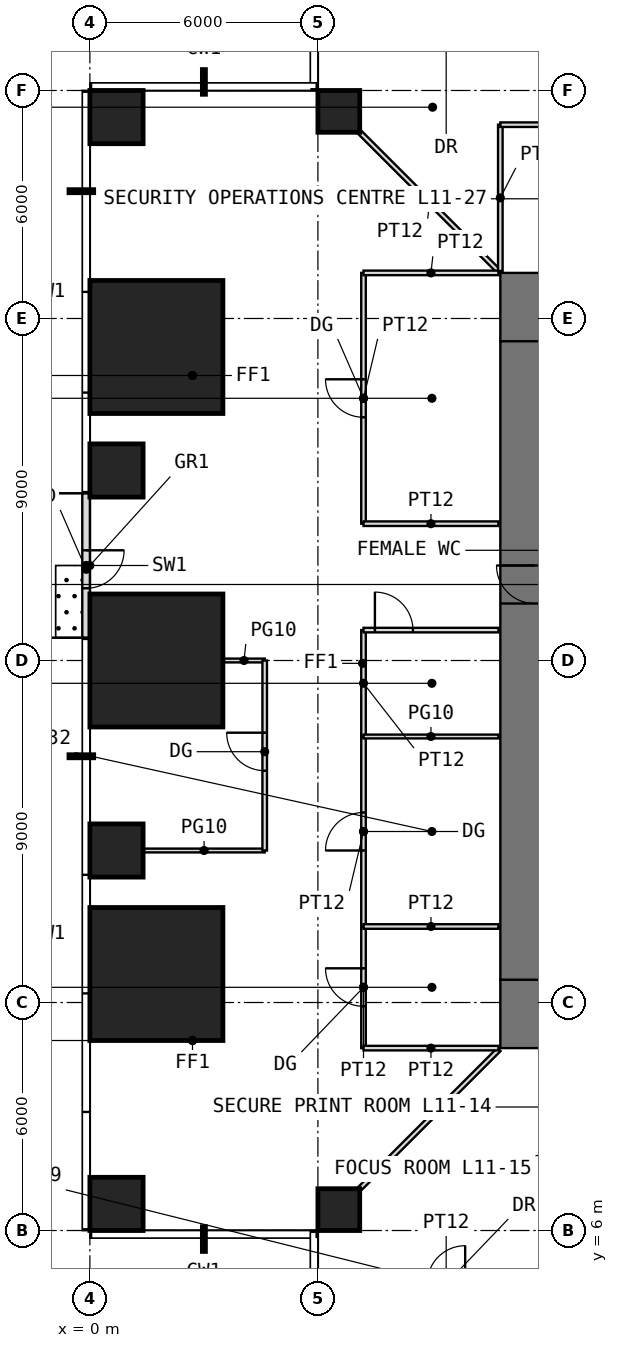
"""IFC4 building model, lengths in metres.
Left out: names, types, materials, properties, quantities, classifications, styles, units other than length and angle.
Written with IfcOpenShell. Run it as: python <this file> out.ifc"""

import sys

from ifc_helpers import new_model, si_unit, direction, frame, frame_2d, origin, origin_2d, place, context, subcontext, project, spatial, rectangle, extrude, element, fill, save


model = new_model("IFC4")
c1 = context("Model", 3, precision=1e-05, world=origin(), true_north=direction((0.0, 1.0)))
c2 = subcontext(c1, "Body", "Model", "MODEL_VIEW")
j1 = project(units=[si_unit("LENGTHUNIT", "METRE"), si_unit("PLANEANGLEUNIT", "RADIAN")], contexts=[c1])
p1 = place(None, origin())
s1 = spatial("IfcSite", under=j1, at=p1, CompositionType="ELEMENT")
p2 = place(p1, origin())
s2 = spatial("IfcBuilding", under=s1, at=p2, CompositionType="ELEMENT")
p3 = place(p2, frame((0.0, 0.0, 50.5)))
s3 = spatial("IfcBuildingStorey", under=s2, at=p3, CompositionType="ELEMENT", Elevation=50.5)
p4 = place(p3, frame((0.7, 6.7, 0.0), z_axis=(0.0, 0.0, 1.0), x_axis=(1.0, 0.0, 0.0)))
e1 = element("IfcColumn", 1, at=p4, inside=s3, PredefinedType="COLUMN", context=c2, shape_type="SweptSolid", body=[
    extrude(rectangle(XDim=1.4, YDim=1.4, at=origin_2d()), origin(), (0.0, 0.0, 1.0), 4.0),
])
p5 = place(p3, frame((6.55, 6.55, 0.0), z_axis=(0.0, 0.0, 1.0), x_axis=(1.0, 0.0, 0.0)))
e2 = element("IfcColumn", 2, at=p5, inside=s3, PredefinedType="COLUMN", context=c2, shape_type="SweptSolid", body=[
    extrude(rectangle(XDim=1.1, YDim=1.1, at=origin_2d()), origin(), (0.0, 0.0, 1.0), 4.0),
])
p6 = place(p3, frame((1.75, 12.75, 0.0), z_axis=(0.0, 0.0, 1.0), x_axis=(1.0, 0.0, 0.0)))
e3 = element("IfcColumn", 3, at=p6, inside=s3, PredefinedType="COLUMN", context=c2, shape_type="SweptSolid", body=[
    extrude(rectangle(XDim=3.5, YDim=3.5, at=origin_2d()), origin(), (0.0, 0.0, 1.0), 4.0),
])
p7 = place(p3, frame((0.7, 16.0, 0.0), z_axis=(0.0, 0.0, 1.0), x_axis=(1.0, 0.0, 0.0)))
e4 = element("IfcColumn", 4, at=p7, inside=s3, PredefinedType="COLUMN", context=c2, shape_type="SweptSolid", body=[
    extrude(rectangle(XDim=1.4, YDim=1.4, at=origin_2d()), origin(), (0.0, 0.0, 1.0), 4.0),
])
p8 = place(p3, frame((1.75, 21.0, 0.0), z_axis=(0.0, 0.0, 1.0), x_axis=(1.0, 0.0, 0.0)))
e5 = element("IfcColumn", 5, at=p8, inside=s3, PredefinedType="COLUMN", context=c2, shape_type="SweptSolid", body=[
    extrude(rectangle(XDim=3.5, YDim=3.5, at=origin_2d()), origin(), (0.0, 0.0, 1.0), 4.0),
])
p9 = place(p3, frame((0.7, 26.0, 0.0), z_axis=(0.0, 0.0, 1.0), x_axis=(1.0, 0.0, 0.0)))
e6 = element("IfcColumn", 6, at=p9, inside=s3, PredefinedType="COLUMN", context=c2, shape_type="SweptSolid", body=[
    extrude(rectangle(XDim=1.4, YDim=1.4, at=origin_2d()), origin(), (0.0, 0.0, 1.0), 4.0),
])
p10 = place(p3, frame((1.75, 29.25, 0.0), z_axis=(0.0, 0.0, 1.0), x_axis=(1.0, 0.0, 0.0)))
e7 = element("IfcColumn", 7, at=p10, inside=s3, PredefinedType="COLUMN", context=c2, shape_type="SweptSolid", body=[
    extrude(rectangle(XDim=3.5, YDim=3.5, at=origin_2d()), origin(), (0.0, 0.0, 1.0), 4.0),
])
p11 = place(p3, frame((0.7, 35.3, 0.0), z_axis=(0.0, 0.0, 1.0), x_axis=(1.0, 0.0, 0.0)))
e8 = element("IfcColumn", 8, at=p11, inside=s3, PredefinedType="COLUMN", context=c2, shape_type="SweptSolid", body=[
    extrude(rectangle(XDim=1.4, YDim=1.4, at=origin_2d()), origin(), (0.0, 0.0, 1.0), 4.0),
])
p12 = place(p3, frame((6.55, 35.45, 0.0), z_axis=(0.0, 0.0, 1.0), x_axis=(1.0, 0.0, 0.0)))
e9 = element("IfcColumn", 9, at=p12, inside=s3, PredefinedType="COLUMN", context=c2, shape_type="SweptSolid", body=[
    extrude(rectangle(XDim=1.1, YDim=1.1, at=origin_2d()), origin(), (0.0, 0.0, 1.0), 4.0),
])
p13 = place(p3, frame((-0.1, 25.4, 0.0), z_axis=(0.0, 0.0, 1.0), x_axis=(0.0, -1.0, 0.0)))
e10 = element("IfcWall", 10, at=p13, inside=s3, PredefinedType="USERDEFINED", context=c2, shape_type="SweptSolid", body=[
    extrude(rectangle(XDim=3.8, YDim=0.2, at=frame_2d((1.9, 0.0))), origin(), (0.0, 0.0, 1.0), 3.75),
])
p14 = place(p13, frame((1.5, 0.0, 0.0)))
e11 = element("IfcOpeningElement", 11, at=p14, cuts=e10, PredefinedType="OPENING", context=c2, shape_type="SweptSolid", body=[
    extrude(rectangle(XDim=1.0, YDim=2.4, at=frame_2d((0.5, 1.2))), frame((0.0, 0.11, 0.0), z_axis=(0.0, -1.0, 0.0), x_axis=(1.0, 0.0, 0.0)), (0.0, 0.0, 1.0), 0.22),
])
p15 = place(p3, frame((10.8, 11.7, -0.05), z_axis=(0.0, 0.0, 1.0), x_axis=(1.0, 0.0, 0.0)))
e12 = element("IfcWall", 12, at=p15, inside=s3, PredefinedType="SHEAR", context=c2, shape_type="SweptSolid", body=[
    extrude(rectangle(XDim=20.4, YDim=1.8, at=frame_2d((10.2, 0.0))), origin(), (0.0, 0.0, 1.0), 4.0),
])
p16 = place(p15, frame((9.2, 0.0, 0.05)))
e13 = element("IfcOpeningElement", 13, at=p16, cuts=e12, PredefinedType="OPENING", context=c2, shape_type="SweptSolid", body=[
    extrude(rectangle(XDim=2.0, YDim=2.2, at=frame_2d((1.0, 1.1))), frame((0.0, 0.91, 0.0), z_axis=(0.0, -1.0, 0.0), x_axis=(1.0, 0.0, 0.0)), (0.0, 0.0, 1.0), 1.82),
])
p17 = place(p3, frame((10.8, 30.3, -0.05), z_axis=(0.0, 0.0, 1.0), x_axis=(1.0, 0.0, 0.0)))
e14 = element("IfcWall", 14, at=p17, inside=s3, PredefinedType="SHEAR", context=c2, shape_type="SweptSolid", body=[
    extrude(rectangle(XDim=20.4, YDim=1.8, at=frame_2d((10.2, 0.0))), origin(), (0.0, 0.0, 1.0), 4.0),
])
p18 = place(p17, frame((9.2, 0.0, 0.05)))
e15 = element("IfcOpeningElement", 15, at=p18, cuts=e14, PredefinedType="OPENING", context=c2, shape_type="SweptSolid", body=[
    extrude(rectangle(XDim=2.0, YDim=2.2, at=frame_2d((1.0, 1.1))), frame((0.0, 0.91, 0.0), z_axis=(0.0, -1.0, 0.0), x_axis=(1.0, 0.0, 0.0)), (0.0, 0.0, 1.0), 1.82),
])
p19 = place(p3, frame((11.7, 12.6, -0.05), z_axis=(0.0, 0.0, 1.0), x_axis=(0.0, 1.0, 0.0)))
e16 = element("IfcWall", 16, at=p19, inside=s3, PredefinedType="SHEAR", context=c2, shape_type="SweptSolid", body=[
    extrude(rectangle(XDim=16.8, YDim=1.8, at=frame_2d((8.4, 0.0))), origin(), (0.0, 0.0, 1.0), 4.0),
])
p20 = place(p19, frame((9.9, 0.0, 0.05)))
e17 = element("IfcOpeningElement", 17, at=p20, cuts=e16, PredefinedType="OPENING", context=c2, shape_type="SweptSolid", body=[
    extrude(rectangle(XDim=1.0, YDim=2.2, at=frame_2d((0.5, 1.1))), frame((0.0, 0.91, 0.0), z_axis=(0.0, -1.0, 0.0), x_axis=(1.0, 0.0, 0.0)), (0.0, 0.0, 1.0), 1.82),
])
p21 = place(p3, frame((1.41, 16.0, 0.0), z_axis=(0.0, 0.0, 1.0), x_axis=(1.0, 0.0, 0.0)))
e18 = element("IfcWall", 18, at=p21, inside=s3, PredefinedType="PARTITIONING", context=c2, shape_type="SweptSolid", body=[
    extrude(rectangle(XDim=3.19, YDim=0.1, at=frame_2d((1.595, 0.0))), origin(), (0.0, 0.0, 1.0), 3.75),
])
p22 = place(p3, frame((3.51, 21.0, 0.0), z_axis=(0.0, 0.0, 1.0), x_axis=(1.0, 0.0, 0.0)))
e19 = element("IfcWall", 19, at=p22, inside=s3, PredefinedType="PARTITIONING", context=c2, shape_type="SweptSolid", body=[
    extrude(rectangle(XDim=1.09, YDim=0.1, at=frame_2d((0.545, 0.0))), origin(), (0.0, 0.0, 1.0), 3.75),
])
p23 = place(p3, frame((4.6, 16.0, 0.0), z_axis=(0.0, 0.0, 1.0), x_axis=(0.0, 1.0, 0.0)))
e20 = element("IfcWall", 20, at=p23, inside=s3, PredefinedType="PARTITIONING", context=c2, shape_type="SweptSolid", body=[
    extrude(rectangle(XDim=5.0, YDim=0.12, at=frame_2d((2.5, 0.0))), origin(), (0.0, 0.0, 1.0), 3.75),
])
p24 = place(p23, frame((2.1, 0.0, 0.0)))
e21 = element("IfcOpeningElement", 21, at=p24, cuts=e20, PredefinedType="OPENING", context=c2, shape_type="SweptSolid", body=[
    extrude(rectangle(XDim=1.0, YDim=2.4, at=frame_2d((0.5, 1.2))), frame((0.0, 0.07, 0.0), z_axis=(0.0, -1.0, 0.0), x_axis=(1.0, 0.0, 0.0)), (0.0, 0.0, 1.0), 0.14),
])
for number, where, z_axis, x_axis in (
    (22, (7.11, 7.11, 0.0), (0.0, 0.0, 1.0), (0.707, 0.707, 0.0)),
    (23, (7.11, 34.89, 0.0), (0.0, 0.0, 1.0), (0.707, -0.707, 0.0)),
):
    element("IfcWall", number, at=place(p3, frame(where, z_axis=z_axis, x_axis=x_axis)), inside=s3, PredefinedType="PARTITIONING", context=c2, shape_type="SweptSolid", body=[
        extrude(rectangle(XDim=5.168, YDim=0.12, at=frame_2d((2.584, 0.0))), origin(), (0.0, 0.0, 1.0), 3.75),
    ])
p25 = place(p3, frame((7.2, 10.8, 0.0), z_axis=(0.0, 0.0, 1.0), x_axis=(0.0, 1.0, 0.0)))
e24 = element("IfcWall", 24, at=p25, inside=s3, PredefinedType="PARTITIONING", context=c2, shape_type="SweptSolid", body=[
    extrude(rectangle(XDim=3.2, YDim=0.12, at=frame_2d((1.6, 0.0))), origin(), (0.0, 0.0, 1.0), 3.75),
])
p26 = place(p25, frame((1.1, 0.0, 0.0)))
e25 = element("IfcOpeningElement", 25, at=p26, cuts=e24, PredefinedType="OPENING", context=c2, shape_type="SweptSolid", body=[
    extrude(rectangle(XDim=1.0, YDim=2.4, at=frame_2d((0.5, 1.2))), frame((0.0, 0.07, 0.0), z_axis=(0.0, -1.0, 0.0), x_axis=(1.0, 0.0, 0.0)), (0.0, 0.0, 1.0), 0.14),
])
p27 = place(p3, frame((7.2, 10.8, 0.0), z_axis=(0.0, 0.0, 1.0), x_axis=(1.0, 0.0, 0.0)))
e26 = element("IfcWall", 26, at=p27, inside=s3, PredefinedType="PARTITIONING", context=c2, shape_type="SweptSolid", body=[
    extrude(rectangle(XDim=3.55, YDim=0.12, at=frame_2d((1.775, 0.0))), origin(), (0.0, 0.0, 1.0), 3.75),
])
p28 = place(p3, frame((7.2, 14.0, 0.0), z_axis=(0.0, 0.0, 1.0), x_axis=(0.0, 1.0, 0.0)))
e27 = element("IfcWall", 27, at=p28, inside=s3, PredefinedType="PARTITIONING", context=c2, shape_type="SweptSolid", body=[
    extrude(rectangle(XDim=5.0, YDim=0.12, at=frame_2d((2.5, 0.0))), origin(), (0.0, 0.0, 1.0), 3.75),
])
p29 = place(p28, frame((2.0, 0.0, 0.0)))
e28 = element("IfcOpeningElement", 28, at=p29, cuts=e27, PredefinedType="OPENING", context=c2, shape_type="SweptSolid", body=[
    extrude(rectangle(XDim=1.0, YDim=2.4, at=frame_2d((0.5, 1.2))), frame((0.0, 0.07, 0.0), z_axis=(0.0, -1.0, 0.0), x_axis=(1.0, 0.0, 0.0)), (0.0, 0.0, 1.0), 0.14),
])
p30 = place(p3, frame((7.2, 14.0, 0.0), z_axis=(0.0, 0.0, 1.0), x_axis=(1.0, 0.0, 0.0)))
e29 = element("IfcWall", 29, at=p30, inside=s3, PredefinedType="PARTITIONING", context=c2, shape_type="SweptSolid", body=[
    extrude(rectangle(XDim=3.55, YDim=0.12, at=frame_2d((1.775, 0.0))), origin(), (0.0, 0.0, 1.0), 3.75),
])
p31 = place(p3, frame((7.2, 19.0, 0.0), z_axis=(0.0, 0.0, 1.0), x_axis=(0.0, 1.0, 0.0)))
e30 = element("IfcWall", 30, at=p31, inside=s3, PredefinedType="PARTITIONING", context=c2, shape_type="SweptSolid", body=[
    extrude(rectangle(XDim=2.8, YDim=0.12, at=frame_2d((1.4, 0.0))), origin(), (0.0, 0.0, 1.0), 3.75),
])
p32 = place(p3, frame((7.2, 19.0, 0.0), z_axis=(0.0, 0.0, 1.0), x_axis=(1.0, 0.0, 0.0)))
e31 = element("IfcWall", 31, at=p32, inside=s3, PredefinedType="PARTITIONING", context=c2, shape_type="SweptSolid", body=[
    extrude(rectangle(XDim=3.55, YDim=0.1, at=frame_2d((1.775, 0.0))), origin(), (0.0, 0.0, 1.0), 3.75),
])
p33 = place(p3, frame((7.2, 21.8, 0.0), z_axis=(0.0, 0.0, 1.0), x_axis=(1.0, 0.0, 0.0)))
e32 = element("IfcWall", 32, at=p33, inside=s3, PredefinedType="PARTITIONING", context=c2, shape_type="SweptSolid", body=[
    extrude(rectangle(XDim=3.55, YDim=0.12, at=frame_2d((1.775, 0.0))), origin(), (0.0, 0.0, 1.0), 3.75),
])
p34 = place(p33, frame((0.3, 0.0, 0.0)))
e33 = element("IfcOpeningElement", 33, at=p34, cuts=e32, PredefinedType="OPENING", context=c2, shape_type="SweptSolid", body=[
    extrude(rectangle(XDim=1.0, YDim=2.4, at=frame_2d((0.5, 1.2))), frame((0.0, 0.07, 0.0), z_axis=(0.0, -1.0, 0.0), x_axis=(1.0, 0.0, 0.0)), (0.0, 0.0, 1.0), 0.14),
])
p35 = place(p3, frame((7.2, 24.6, 0.0), z_axis=(0.0, 0.0, 1.0), x_axis=(0.0, 1.0, 0.0)))
e34 = element("IfcWall", 34, at=p35, inside=s3, PredefinedType="PARTITIONING", context=c2, shape_type="SweptSolid", body=[
    extrude(rectangle(XDim=6.6, YDim=0.12, at=frame_2d((3.3, 0.0))), origin(), (0.0, 0.0, 1.0), 3.75),
])
p36 = place(p35, frame((2.8, 0.0, 0.0)))
e35 = element("IfcOpeningElement", 35, at=p36, cuts=e34, PredefinedType="OPENING", context=c2, shape_type="SweptSolid", body=[
    extrude(rectangle(XDim=1.0, YDim=2.4, at=frame_2d((0.5, 1.2))), frame((0.0, 0.07, 0.0), z_axis=(0.0, -1.0, 0.0), x_axis=(1.0, 0.0, 0.0)), (0.0, 0.0, 1.0), 0.14),
])
for number, where, z_axis, x_axis in (
    (36, (7.2, 24.6, 0.0), (0.0, 0.0, 1.0), (1.0, 0.0, 0.0)),
    (37, (7.2, 31.2, 0.0), (0.0, 0.0, 1.0), (1.0, 0.0, 0.0)),
):
    element("IfcWall", number, at=place(p3, frame(where, z_axis=z_axis, x_axis=x_axis)), inside=s3, PredefinedType="PARTITIONING", context=c2, shape_type="SweptSolid", body=[
        extrude(rectangle(XDim=3.55, YDim=0.12, at=frame_2d((1.775, 0.0))), origin(), (0.0, 0.0, 1.0), 3.75),
    ])
p37 = place(p3, frame((10.8, 31.25, 0.0), z_axis=(0.0, 0.0, 1.0), x_axis=(0.0, 1.0, 0.0)))
e38 = element("IfcWall", 38, at=p37, inside=s3, PredefinedType="PARTITIONING", context=c2, shape_type="SweptSolid", body=[
    extrude(rectangle(XDim=3.85, YDim=0.12, at=frame_2d((1.925, 0.0))), origin(), (0.0, 0.0, 1.0), 3.75),
])
p38 = place(p3, frame((10.8, 35.1, 0.0), z_axis=(0.0, 0.0, 1.0), x_axis=(1.0, 0.0, 0.0)))
e39 = element("IfcWall", 39, at=p38, inside=s3, PredefinedType="PARTITIONING", context=c2, shape_type="SweptSolid", body=[
    extrude(rectangle(XDim=7.6, YDim=0.12, at=frame_2d((3.8, 0.0))), origin(), (0.0, 0.0, 1.0), 3.75),
])
p39 = place(p38, frame((3.3, 0.0, 0.0)))
e40 = element("IfcOpeningElement", 40, at=p39, cuts=e39, PredefinedType="OPENING", context=c2, shape_type="SweptSolid", body=[
    extrude(rectangle(XDim=1.0, YDim=2.2, at=frame_2d((0.5, 1.1))), frame((0.0, 0.07, 0.0), z_axis=(0.0, -1.0, 0.0), x_axis=(1.0, 0.0, 0.0)), (0.0, 0.0, 1.0), 0.14),
])
p40 = place(p14, origin())
e41 = element("IfcDoor", 41, at=p40, inside=s3, OperationType="SINGLE_SWING_LEFT", PredefinedType="DOOR", context=c2, shape_type="SweptSolid", body=[
    extrude(rectangle(XDim=1.0, YDim=2.4, at=frame_2d((0.5, 1.2))), frame((0.0, 0.025, 0.0), z_axis=(0.0, -1.0, 0.0), x_axis=(1.0, 0.0, 0.0)), (0.0, 0.0, 1.0), 0.05),
])
fill(e11, e41)
p41 = place(p20, origin())
e42 = element("IfcDoor", 42, at=p41, inside=s3, OperationType="SINGLE_SWING_RIGHT", PredefinedType="DOOR", context=c2, shape_type="SweptSolid", body=[
    extrude(rectangle(XDim=1.0, YDim=2.2, at=frame_2d((0.5, 1.1))), frame((0.0, 0.025, 0.0), z_axis=(0.0, -1.0, 0.0), x_axis=(1.0, 0.0, 0.0)), (0.0, 0.0, 1.0), 0.05),
])
fill(e17, e42)
p42 = place(p26, origin())
e43 = element("IfcDoor", 43, at=p42, inside=s3, OperationType="SINGLE_SWING_RIGHT", PredefinedType="DOOR", context=c2, shape_type="SweptSolid", body=[
    extrude(rectangle(XDim=1.0, YDim=2.4, at=frame_2d((0.5, 1.2))), frame((0.0, 0.025, 0.0), z_axis=(0.0, -1.0, 0.0), x_axis=(1.0, 0.0, 0.0)), (0.0, 0.0, 1.0), 0.05),
])
fill(e25, e43)
p43 = place(p29, origin())
e44 = element("IfcDoor", 44, at=p43, inside=s3, OperationType="SINGLE_SWING_LEFT", PredefinedType="DOOR", context=c2, shape_type="SweptSolid", body=[
    extrude(rectangle(XDim=1.0, YDim=2.4, at=frame_2d((0.5, 1.2))), frame((0.0, 0.025, 0.0), z_axis=(0.0, -1.0, 0.0), x_axis=(1.0, 0.0, 0.0)), (0.0, 0.0, 1.0), 0.05),
])
fill(e28, e44)
p44 = place(p36, origin())
e45 = element("IfcDoor", 45, at=p44, inside=s3, OperationType="SINGLE_SWING_RIGHT", PredefinedType="DOOR", context=c2, shape_type="SweptSolid", body=[
    extrude(rectangle(XDim=1.0, YDim=2.4, at=frame_2d((0.5, 1.2))), frame((0.0, 0.025, 0.0), z_axis=(0.0, -1.0, 0.0), x_axis=(1.0, 0.0, 0.0)), (0.0, 0.0, 1.0), 0.05),
])
fill(e35, e45)
p45 = place(p24, origin())
e46 = element("IfcDoor", 46, at=p45, inside=s3, OperationType="SINGLE_SWING_RIGHT", PredefinedType="DOOR", context=c2, shape_type="SweptSolid", body=[
    extrude(rectangle(XDim=1.0, YDim=2.4, at=frame_2d((0.5, 1.2))), frame((0.0, 0.025, 0.0), z_axis=(0.0, -1.0, 0.0), x_axis=(1.0, 0.0, 0.0)), (0.0, 0.0, 1.0), 0.05),
])
fill(e21, e46)
p46 = place(p34, origin())
e47 = element("IfcDoor", 47, at=p46, inside=s3, OperationType="SINGLE_SWING_LEFT", PredefinedType="DOOR", context=c2, shape_type="SweptSolid", body=[
    extrude(rectangle(XDim=1.0, YDim=2.4, at=frame_2d((0.5, 1.2))), frame((0.0, 0.025, 0.0), z_axis=(0.0, -1.0, 0.0), x_axis=(1.0, 0.0, 0.0)), (0.0, 0.0, 1.0), 0.05),
])
fill(e33, e47)
save(model, sys.argv[1])
